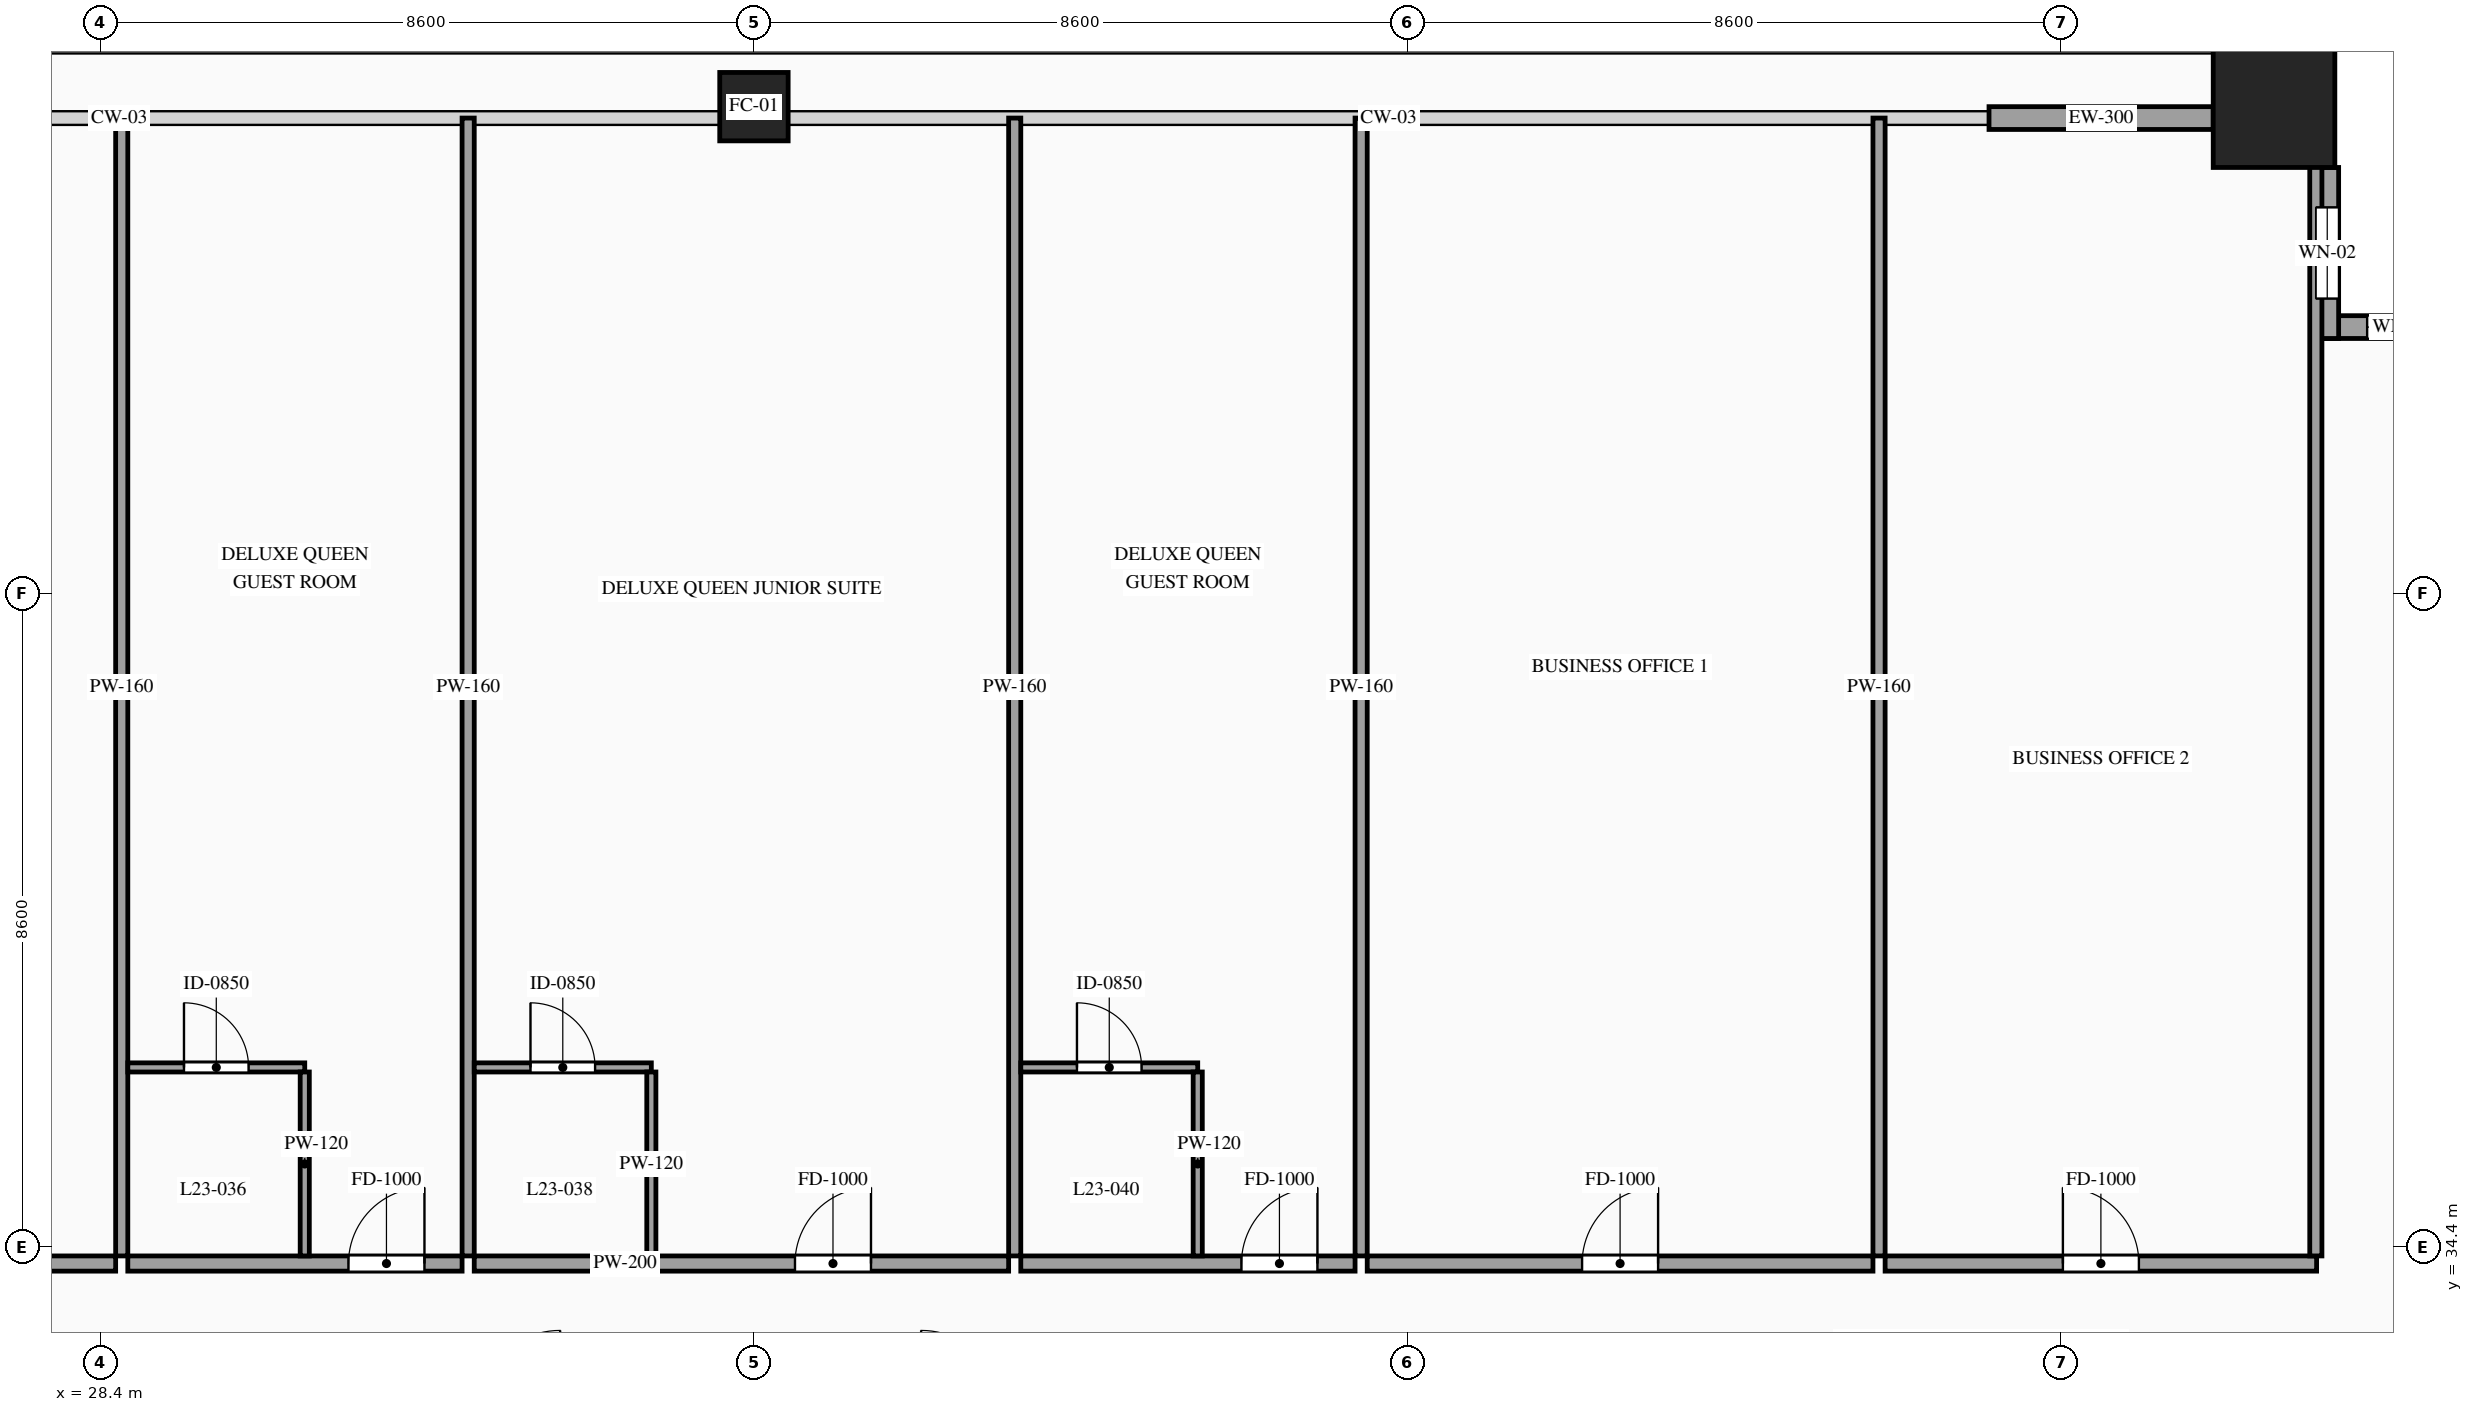
"""IFC4 building model, lengths in metres.
Left out: names, types, materials, properties, quantities, classifications, styles, units other than length and angle.
Written with IfcOpenShell. Run it as: python <this file> out.ifc"""

import sys

from ifc_helpers import new_model, si_unit, direction, frame, frame_2d, origin, origin_2d, place, context, subcontext, project, spatial, rectangle, hollow_rectangle, extrude, source, transform, mapped, element, fill, save


model = new_model("IFC4")
c1 = context("Model", 3, precision=1e-05, world=origin(), true_north=direction((0.0, 1.0)))
c2 = subcontext(c1, "Body", "Model", "MODEL_VIEW")
j1 = project(units=[si_unit("LENGTHUNIT", "METRE"), si_unit("PLANEANGLEUNIT", "RADIAN")], contexts=[c1])
p1 = place(None, origin())
s1 = spatial("IfcSite", under=j1, at=p1, CompositionType="ELEMENT")
p2 = place(p1, origin())
s2 = spatial("IfcBuilding", under=s1, at=p2, CompositionType="ELEMENT")
p3 = place(p2, frame((0.0, 0.0, 90.2)))
s3 = spatial("IfcBuildingStorey", under=s2, at=p3, CompositionType="ELEMENT", Elevation=90.2)
m1 = source(origin(), c2, "Body", "SweptSolid", [
    extrude(hollow_rectangle(XDim=0.9, YDim=0.9, WallThickness=0.042, at=origin_2d()), origin(), (0.0, 0.0, 1.0), 3.6),
])
p4 = place(p3, frame((37.0, 49.4, 0.0), z_axis=(0.0, 0.0, 1.0), x_axis=(1.0, 0.0, 0.0)))
e1 = element("IfcColumn", 1, at=p4, inside=s3, PredefinedType="COLUMN", context=c2, shape_type="MappedRepresentation", body=[
    mapped(m1, transform((0.0, 0.0, 0.0), scale=1.0)),
])
m2 = source(origin(), c2, "Body", "SweptSolid", [
    extrude(hollow_rectangle(XDim=1.6, YDim=1.6, WallThickness=0.07, at=origin_2d()), origin(), (0.0, 0.0, 1.0), 3.6),
])
p5 = place(p3, frame((57.0, 49.4, 0.0), z_axis=(0.0, 0.0, 1.0), x_axis=(1.0, 0.0, 0.0)))
e2 = element("IfcColumn", 2, at=p5, inside=s3, PredefinedType="COLUMN", context=c2, shape_type="MappedRepresentation", body=[
    mapped(m2, transform((0.0, 0.0, 0.0), scale=1.0)),
])
p6 = place(p3, frame((59.8, 46.5, 0.0), z_axis=(0.0, 0.0, 1.0), x_axis=(-1.0, 0.0, 0.0)))
e3 = element("IfcWall", 3, at=p6, inside=s3, PredefinedType="SOLIDWALL", context=c2, shape_type="SweptSolid", body=[
    extrude(rectangle(XDim=2.25, YDim=0.3, at=frame_2d((1.125, 0.0))), origin(), (0.0, 0.0, 1.0), 3.38),
])
p7 = place(p6, frame((0.675, 0.0, 0.85)))
e4 = element("IfcOpeningElement", 4, at=p7, cuts=e3, PredefinedType="OPENING", context=c2, shape_type="SweptSolid", body=[
    extrude(rectangle(XDim=0.9, YDim=1.5, at=frame_2d((0.45, 0.75))), frame((0.0, 0.165, 0.0), z_axis=(0.0, -1.0, 0.0), x_axis=(1.0, 0.0, 0.0)), (0.0, 0.0, 1.0), 0.33),
])
p8 = place(p3, frame((57.7, 46.35, 0.0), z_axis=(0.0, 0.0, 1.0), x_axis=(0.0, 1.0, 0.0)))
e5 = element("IfcWall", 5, at=p8, inside=s3, PredefinedType="SOLIDWALL", context=c2, shape_type="SweptSolid", body=[
    extrude(rectangle(XDim=2.25, YDim=0.3, at=frame_2d((1.125, 0.0))), origin(), (0.0, 0.0, 1.0), 3.38),
])
p9 = place(p8, frame((0.525, 0.0, 0.85)))
e6 = element("IfcOpeningElement", 6, at=p9, cuts=e5, PredefinedType="OPENING", context=c2, shape_type="SweptSolid", body=[
    extrude(rectangle(XDim=1.2, YDim=2.1, at=frame_2d((0.6, 1.05))), frame((0.0, 0.165, 0.0), z_axis=(0.0, -1.0, 0.0), x_axis=(1.0, 0.0, 0.0)), (0.0, 0.0, 1.0), 0.33),
])
m3 = source(origin(), c2, "Body", "SweptSolid", [
    extrude(rectangle(XDim=2.95, YDim=0.3, at=frame_2d((1.475, 0.0))), origin(), (0.0, 0.0, 1.0), 2.775),
])
p10 = place(p3, frame((53.25, 49.25, 0.0), z_axis=(0.0, 0.0, 1.0), x_axis=(1.0, 0.0, 0.0)))
e7 = element("IfcWall", 7, at=p10, inside=s3, PredefinedType="SOLIDWALL", context=c2, shape_type="MappedRepresentation", body=[
    mapped(m3, transform((0.0, 0.0, 0.0), scale=1.0)),
])
p11 = place(p3, frame((22.277, 34.18, 0.0), z_axis=(0.0, 0.0, 1.0), x_axis=(1.0, 0.0, 0.0)))
e8 = element("IfcWall", 8, at=p11, inside=s3, PredefinedType="PARTITIONING", context=c2, shape_type="SweptSolid", body=[
    extrude(rectangle(XDim=6.325, YDim=0.2, at=frame_2d((3.163, 0.0))), origin(), (0.0, 0.0, 1.0), 3.38),
])
p12 = place(p11, frame((3.868, 0.0, 0.0)))
e9 = element("IfcOpeningElement", 9, at=p12, cuts=e8, PredefinedType="OPENING", context=c2, shape_type="SweptSolid", body=[
    extrude(rectangle(XDim=1.0, YDim=2.2, at=frame_2d((0.5, 1.1))), frame((0.0, 0.115, 0.0), z_axis=(0.0, -1.0, 0.0), x_axis=(1.0, 0.0, 0.0)), (0.0, 0.0, 1.0), 0.23),
])
m4 = source(origin(), c2, "Body", "SweptSolid", [
    extrude(rectangle(XDim=14.97, YDim=0.16, at=frame_2d((7.485, 0.0))), origin(), (0.0, 0.0, 1.0), 3.38),
])
p13 = place(p3, frame((28.682, 34.28, 0.0), z_axis=(0.0, 0.0, 1.0), x_axis=(0.0, 1.0, 0.0)))
e10 = element("IfcWall", 10, at=p13, inside=s3, PredefinedType="PARTITIONING", context=c2, shape_type="MappedRepresentation", body=[
    mapped(m4, transform((0.0, 0.0, 0.0), scale=1.0)),
])
p14 = place(p3, frame((28.762, 34.18, 0.0), z_axis=(0.0, 0.0, 1.0), x_axis=(1.0, 0.0, 0.0)))
e11 = element("IfcWall", 11, at=p14, inside=s3, PredefinedType="PARTITIONING", context=c2, shape_type="SweptSolid", body=[
    extrude(rectangle(XDim=4.398, YDim=0.2, at=frame_2d((2.199, 0.0))), origin(), (0.0, 0.0, 1.0), 3.38),
])
p15 = place(p14, frame((2.903, 0.0, 0.0)))
e12 = element("IfcOpeningElement", 12, at=p15, cuts=e11, PredefinedType="OPENING", context=c2, shape_type="SweptSolid", body=[
    extrude(rectangle(XDim=1.0, YDim=2.2, at=frame_2d((0.5, 1.1))), frame((0.0, 0.115, 0.0), z_axis=(0.0, -1.0, 0.0), x_axis=(1.0, 0.0, 0.0)), (0.0, 0.0, 1.0), 0.23),
])
p16 = place(p3, frame((33.24, 34.28, 0.0), z_axis=(0.0, 0.0, 1.0), x_axis=(0.0, 1.0, 0.0)))
e13 = element("IfcWall", 13, at=p16, inside=s3, PredefinedType="PARTITIONING", context=c2, shape_type="MappedRepresentation", body=[
    mapped(m4, transform((0.0, 0.0, 0.0), scale=1.0)),
])
p17 = place(p3, frame((28.762, 36.76, 0.0), z_axis=(0.0, 0.0, 1.0), x_axis=(1.0, 0.0, 0.0)))
e14 = element("IfcWall", 14, at=p17, inside=s3, PredefinedType="PARTITIONING", context=c2, shape_type="SweptSolid", body=[
    extrude(rectangle(XDim=2.328, YDim=0.12, at=frame_2d((1.164, 0.0))), origin(), (0.0, 0.0, 1.0), 3.38),
])
p18 = place(p17, frame((0.739, 0.0, 0.0)))
e15 = element("IfcOpeningElement", 15, at=p18, cuts=e14, PredefinedType="OPENING", context=c2, shape_type="SweptSolid", body=[
    extrude(rectangle(XDim=0.85, YDim=2.1, at=frame_2d((0.425, 1.05))), frame((0.0, 0.075, 0.0), z_axis=(0.0, -1.0, 0.0), x_axis=(1.0, 0.0, 0.0)), (0.0, 0.0, 1.0), 0.15),
])
m5 = source(origin(), c2, "Body", "SweptSolid", [
    extrude(rectangle(XDim=2.42, YDim=0.12, at=frame_2d((1.21, 0.0))), origin(), (0.0, 0.0, 1.0), 3.38),
])
p19 = place(p3, frame((31.09, 34.28, 0.0), z_axis=(0.0, 0.0, 1.0), x_axis=(0.0, 1.0, 0.0)))
e16 = element("IfcWall", 16, at=p19, inside=s3, PredefinedType="PARTITIONING", context=c2, shape_type="MappedRepresentation", body=[
    mapped(m5, transform((0.0, 0.0, 0.0), scale=1.0)),
])
p20 = place(p3, frame((33.32, 34.18, 0.0), z_axis=(0.0, 0.0, 1.0), x_axis=(1.0, 0.0, 0.0)))
e17 = element("IfcWall", 17, at=p20, inside=s3, PredefinedType="PARTITIONING", context=c2, shape_type="SweptSolid", body=[
    extrude(rectangle(XDim=7.031, YDim=0.2, at=frame_2d((3.516, 0.0))), origin(), (0.0, 0.0, 1.0), 3.38),
])
p21 = place(p20, frame((4.22, 0.0, 0.0)))
e18 = element("IfcOpeningElement", 18, at=p21, cuts=e17, PredefinedType="OPENING", context=c2, shape_type="SweptSolid", body=[
    extrude(rectangle(XDim=1.0, YDim=2.2, at=frame_2d((0.5, 1.1))), frame((0.0, 0.115, 0.0), z_axis=(0.0, -1.0, 0.0), x_axis=(1.0, 0.0, 0.0)), (0.0, 0.0, 1.0), 0.23),
])
p22 = place(p3, frame((40.431, 34.28, 0.0), z_axis=(0.0, 0.0, 1.0), x_axis=(0.0, 1.0, 0.0)))
e19 = element("IfcWall", 19, at=p22, inside=s3, PredefinedType="PARTITIONING", context=c2, shape_type="MappedRepresentation", body=[
    mapped(m4, transform((0.0, 0.0, 0.0), scale=1.0)),
])
p23 = place(p3, frame((33.32, 36.76, 0.0), z_axis=(0.0, 0.0, 1.0), x_axis=(1.0, 0.0, 0.0)))
e20 = element("IfcWall", 20, at=p23, inside=s3, PredefinedType="PARTITIONING", context=c2, shape_type="SweptSolid", body=[
    extrude(rectangle(XDim=2.33, YDim=0.12, at=frame_2d((1.165, 0.0))), origin(), (0.0, 0.0, 1.0), 3.38),
])
p24 = place(p23, frame((0.74, 0.0, 0.0)))
e21 = element("IfcOpeningElement", 21, at=p24, cuts=e20, PredefinedType="OPENING", context=c2, shape_type="SweptSolid", body=[
    extrude(rectangle(XDim=0.85, YDim=2.1, at=frame_2d((0.425, 1.05))), frame((0.0, 0.075, 0.0), z_axis=(0.0, -1.0, 0.0), x_axis=(1.0, 0.0, 0.0)), (0.0, 0.0, 1.0), 0.15),
])
p25 = place(p3, frame((35.65, 34.28, 0.0), z_axis=(0.0, 0.0, 1.0), x_axis=(0.0, 1.0, 0.0)))
e22 = element("IfcWall", 22, at=p25, inside=s3, PredefinedType="PARTITIONING", context=c2, shape_type="MappedRepresentation", body=[
    mapped(m5, transform((0.0, 0.0, 0.0), scale=1.0)),
])
p26 = place(p3, frame((40.511, 34.18, 0.0), z_axis=(0.0, 0.0, 1.0), x_axis=(1.0, 0.0, 0.0)))
e23 = element("IfcWall", 23, at=p26, inside=s3, PredefinedType="PARTITIONING", context=c2, shape_type="SweptSolid", body=[
    extrude(rectangle(XDim=4.398, YDim=0.2, at=frame_2d((2.199, 0.0))), origin(), (0.0, 0.0, 1.0), 3.38),
])
p27 = place(p26, frame((2.903, 0.0, 0.0)))
e24 = element("IfcOpeningElement", 24, at=p27, cuts=e23, PredefinedType="OPENING", context=c2, shape_type="SweptSolid", body=[
    extrude(rectangle(XDim=1.0, YDim=2.2, at=frame_2d((0.5, 1.1))), frame((0.0, 0.115, 0.0), z_axis=(0.0, -1.0, 0.0), x_axis=(1.0, 0.0, 0.0)), (0.0, 0.0, 1.0), 0.23),
])
p28 = place(p3, frame((44.989, 34.28, 0.0), z_axis=(0.0, 0.0, 1.0), x_axis=(0.0, 1.0, 0.0)))
e25 = element("IfcWall", 25, at=p28, inside=s3, PredefinedType="PARTITIONING", context=c2, shape_type="MappedRepresentation", body=[
    mapped(m4, transform((0.0, 0.0, 0.0), scale=1.0)),
])
p29 = place(p3, frame((40.511, 36.76, 0.0), z_axis=(0.0, 0.0, 1.0), x_axis=(1.0, 0.0, 0.0)))
e26 = element("IfcWall", 26, at=p29, inside=s3, PredefinedType="PARTITIONING", context=c2, shape_type="SweptSolid", body=[
    extrude(rectangle(XDim=2.328, YDim=0.12, at=frame_2d((1.164, 0.0))), origin(), (0.0, 0.0, 1.0), 3.38),
])
p30 = place(p29, frame((0.739, 0.0, 0.0)))
e27 = element("IfcOpeningElement", 27, at=p30, cuts=e26, PredefinedType="OPENING", context=c2, shape_type="SweptSolid", body=[
    extrude(rectangle(XDim=0.85, YDim=2.1, at=frame_2d((0.425, 1.05))), frame((0.0, 0.075, 0.0), z_axis=(0.0, -1.0, 0.0), x_axis=(1.0, 0.0, 0.0)), (0.0, 0.0, 1.0), 0.15),
])
p31 = place(p3, frame((42.839, 34.28, 0.0), z_axis=(0.0, 0.0, 1.0), x_axis=(0.0, 1.0, 0.0)))
e28 = element("IfcWall", 28, at=p31, inside=s3, PredefinedType="PARTITIONING", context=c2, shape_type="MappedRepresentation", body=[
    mapped(m5, transform((0.0, 0.0, 0.0), scale=1.0)),
])
p32 = place(p3, frame((45.069, 34.18, 0.0), z_axis=(0.0, 0.0, 1.0), x_axis=(1.0, 0.0, 0.0)))
e29 = element("IfcWall", 29, at=p32, inside=s3, PredefinedType="PARTITIONING", context=c2, shape_type="SweptSolid", body=[
    extrude(rectangle(XDim=6.654, YDim=0.2, at=frame_2d((3.327, 0.0))), origin(), (0.0, 0.0, 1.0), 3.38),
])
p33 = place(p32, frame((2.827, 0.0, 0.0)))
e30 = element("IfcOpeningElement", 30, at=p33, cuts=e29, PredefinedType="OPENING", context=c2, shape_type="SweptSolid", body=[
    extrude(rectangle(XDim=1.0, YDim=2.2, at=frame_2d((0.5, 1.1))), frame((0.0, 0.115, 0.0), z_axis=(0.0, -1.0, 0.0), x_axis=(1.0, 0.0, 0.0)), (0.0, 0.0, 1.0), 0.23),
])
p34 = place(p3, frame((51.803, 34.28, 0.0), z_axis=(0.0, 0.0, 1.0), x_axis=(0.0, 1.0, 0.0)))
e31 = element("IfcWall", 31, at=p34, inside=s3, PredefinedType="PARTITIONING", context=c2, shape_type="MappedRepresentation", body=[
    mapped(m4, transform((0.0, 0.0, 0.0), scale=1.0)),
])
p35 = place(p3, frame((51.883, 34.18, 0.0), z_axis=(0.0, 0.0, 1.0), x_axis=(1.0, 0.0, 0.0)))
e32 = element("IfcWall", 32, at=p35, inside=s3, PredefinedType="PARTITIONING", context=c2, shape_type="SweptSolid", body=[
    extrude(rectangle(XDim=5.677, YDim=0.2, at=frame_2d((2.838, 0.0))), origin(), (0.0, 0.0, 1.0), 3.38),
])
p36 = place(p35, frame((2.339, 0.0, 0.0)))
e33 = element("IfcOpeningElement", 33, at=p36, cuts=e32, PredefinedType="OPENING", context=c2, shape_type="SweptSolid", body=[
    extrude(rectangle(XDim=1.0, YDim=2.2, at=frame_2d((0.5, 1.1))), frame((0.0, 0.115, 0.0), z_axis=(0.0, -1.0, 0.0), x_axis=(1.0, 0.0, 0.0)), (0.0, 0.0, 1.0), 0.23),
])
m6 = source(origin(), c2, "Body", "SweptSolid", [
    extrude(rectangle(XDim=14.82, YDim=0.16, at=frame_2d((7.41, 0.0))), origin(), (0.0, 0.0, 1.0), 3.38),
])
p37 = place(p3, frame((57.55, 34.28, 0.0), z_axis=(0.0, 0.0, 1.0), x_axis=(0.0, 1.0, 0.0)))
e34 = element("IfcWall", 34, at=p37, inside=s3, PredefinedType="PARTITIONING", context=c2, shape_type="MappedRepresentation", body=[
    mapped(m6, transform((0.0, 0.0, 0.0), scale=1.0)),
])
m7 = source(origin(), c2, "Body", "SweptSolid", [
    extrude(rectangle(XDim=0.9, YDim=1.5, at=frame_2d((0.45, 0.75))), frame((0.0, 0.03, 0.0), z_axis=(0.0, -1.0, 0.0), x_axis=(1.0, 0.0, 0.0)), (0.0, 0.0, 1.0), 0.06),
])
p38 = place(p7, origin())
e35 = element("IfcWindow", 35, at=p38, inside=s3, PartitioningType="SINGLE_PANEL", PredefinedType="WINDOW", context=c2, shape_type="MappedRepresentation", body=[
    mapped(m7, transform((0.0, 0.0, 0.0), scale=1.0)),
])
fill(e4, e35)
m8 = source(origin(), c2, "Body", "SweptSolid", [
    extrude(rectangle(XDim=1.2, YDim=2.1, at=frame_2d((0.6, 1.05))), frame((0.0, 0.03, 0.0), z_axis=(0.0, -1.0, 0.0), x_axis=(1.0, 0.0, 0.0)), (0.0, 0.0, 1.0), 0.06),
])
p39 = place(p9, origin())
e36 = element("IfcWindow", 36, at=p39, inside=s3, PartitioningType="SINGLE_PANEL", PredefinedType="WINDOW", context=c2, shape_type="MappedRepresentation", body=[
    mapped(m8, transform((0.0, 0.0, 0.0), scale=1.0)),
])
fill(e6, e36)
m9 = source(origin(), c2, "Body", "SweptSolid", [
    extrude(rectangle(XDim=1.0, YDim=2.2, at=frame_2d((0.5, 1.1))), frame((0.0, 0.025, 0.0), z_axis=(0.0, -1.0, 0.0), x_axis=(1.0, 0.0, 0.0)), (0.0, 0.0, 1.0), 0.05),
])
p40 = place(p15, origin())
e37 = element("IfcDoor", 37, at=p40, inside=s3, OperationType="SINGLE_SWING_RIGHT", PredefinedType="DOOR", context=c2, shape_type="MappedRepresentation", body=[
    mapped(m9, transform((0.0, 0.0, 0.0), scale=1.0)),
])
fill(e12, e37)
m10 = source(origin(), c2, "Body", "SweptSolid", [
    extrude(rectangle(XDim=0.85, YDim=2.1, at=frame_2d((0.425, 1.05))), frame((0.0, 0.025, 0.0), z_axis=(0.0, -1.0, 0.0), x_axis=(1.0, 0.0, 0.0)), (0.0, 0.0, 1.0), 0.05),
])
p41 = place(p18, origin())
e38 = element("IfcDoor", 38, at=p41, inside=s3, OperationType="SINGLE_SWING_LEFT", PredefinedType="DOOR", context=c2, shape_type="MappedRepresentation", body=[
    mapped(m10, transform((0.0, 0.0, 0.0), scale=1.0)),
])
fill(e15, e38)
p42 = place(p21, origin())
e39 = element("IfcDoor", 39, at=p42, inside=s3, OperationType="SINGLE_SWING_RIGHT", PredefinedType="DOOR", context=c2, shape_type="MappedRepresentation", body=[
    mapped(m9, transform((0.0, 0.0, 0.0), scale=1.0)),
])
fill(e18, e39)
p43 = place(p24, origin())
e40 = element("IfcDoor", 40, at=p43, inside=s3, OperationType="SINGLE_SWING_LEFT", PredefinedType="DOOR", context=c2, shape_type="MappedRepresentation", body=[
    mapped(m10, transform((0.0, 0.0, 0.0), scale=1.0)),
])
fill(e21, e40)
p44 = place(p27, origin())
e41 = element("IfcDoor", 41, at=p44, inside=s3, OperationType="SINGLE_SWING_RIGHT", PredefinedType="DOOR", context=c2, shape_type="MappedRepresentation", body=[
    mapped(m9, transform((0.0, 0.0, 0.0), scale=1.0)),
])
fill(e24, e41)
p45 = place(p30, origin())
e42 = element("IfcDoor", 42, at=p45, inside=s3, OperationType="SINGLE_SWING_LEFT", PredefinedType="DOOR", context=c2, shape_type="MappedRepresentation", body=[
    mapped(m10, transform((0.0, 0.0, 0.0), scale=1.0)),
])
fill(e27, e42)
p46 = place(p33, origin())
e43 = element("IfcDoor", 43, at=p46, inside=s3, OperationType="SINGLE_SWING_RIGHT", PredefinedType="DOOR", context=c2, shape_type="MappedRepresentation", body=[
    mapped(m9, transform((0.0, 0.0, 0.0), scale=1.0)),
])
fill(e30, e43)
p47 = place(p36, origin())
e44 = element("IfcDoor", 44, at=p47, inside=s3, OperationType="SINGLE_SWING_LEFT", PredefinedType="DOOR", context=c2, shape_type="MappedRepresentation", body=[
    mapped(m9, transform((0.0, 0.0, 0.0), scale=1.0)),
])
fill(e33, e44)
save(model, sys.argv[1])
